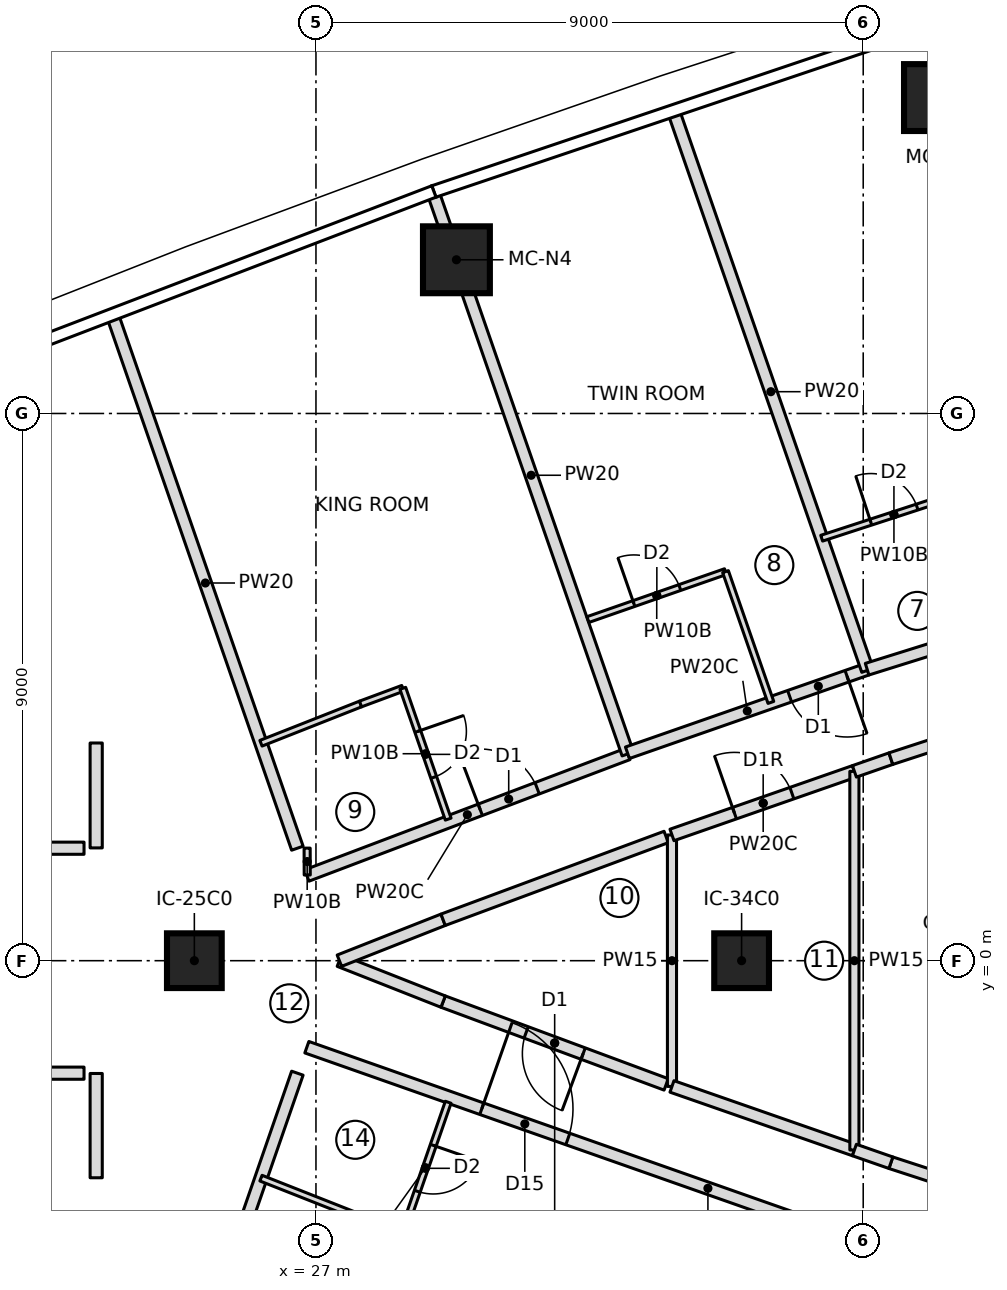
"""IFC4 building model, lengths in metres.
Left out: names, types, materials, properties, quantities, classifications, styles, units other than length and angle.
Written with IfcOpenShell. Run it as: python <this file> out.ifc"""

import sys

from ifc_helpers import new_model, si_unit, direction, frame, frame_2d, origin, origin_2d, place, context, subcontext, project, spatial, rectangle, extrude, element, fill, save


model = new_model("IFC4")
c1 = context("Model", 3, precision=1e-05, world=origin(), true_north=direction((0.0, 1.0)))
c2 = subcontext(c1, "Body", "Model", "MODEL_VIEW")
j1 = project(units=[si_unit("LENGTHUNIT", "METRE"), si_unit("PLANEANGLEUNIT", "RADIAN")], contexts=[c1])
p1 = place(None, origin())
s1 = spatial("IfcSite", under=j1, at=p1, CompositionType="ELEMENT")
p2 = place(p1, origin())
s2 = spatial("IfcBuilding", under=s1, at=p2, CompositionType="ELEMENT")
p3 = place(p2, frame((0.0, 0.0, 296.3)))
s3 = spatial("IfcBuildingStorey", under=s2, at=p3, CompositionType="ELEMENT", Elevation=296.3)
for number, where, z_axis, x_axis in (
    (1, (37.221, 14.196, 0.0), (0.0, 0.0, 1.0), (1.0, 0.0, 0.0)),
    (2, (29.31, 11.528, 0.0), (0.0, 0.0, 1.0), (1.0, 0.0, 0.0)),
):
    element("IfcColumn", number, at=place(p3, frame(where, z_axis=z_axis, x_axis=x_axis)), inside=s3, PredefinedType="COLUMN", context=c2, shape_type="SweptSolid", body=[
        extrude(rectangle(XDim=1.1, YDim=1.1, at=origin_2d()), origin(), (0.0, 0.0, 1.0), 3.55),
    ])
for number, where, z_axis, x_axis in (
    (3, (25.0, 0.0, 0.0), (0.0, 0.0, 1.0), (1.0, 0.0, 0.0)),
    (4, (34.0, 0.0, 0.0), (0.0, 0.0, 1.0), (1.0, 0.0, 0.0)),
):
    element("IfcColumn", number, at=place(p3, frame(where, z_axis=z_axis, x_axis=x_axis)), inside=s3, PredefinedType="COLUMN", context=c2, shape_type="SweptSolid", body=[
        extrude(rectangle(XDim=0.9, YDim=0.9, at=origin_2d()), origin(), (0.0, 0.0, 1.0), 3.55),
    ])
p4 = place(p3, frame((13.637, 1.85, 0.0), z_axis=(0.0, 0.0, 1.0), x_axis=(1.0, 0.0, 0.0)))
e5 = element("IfcWall", 5, at=p4, inside=s3, PredefinedType="PARTITIONING", context=c2, shape_type="SweptSolid", body=[
    extrude(rectangle(XDim=9.549, YDim=0.2, at=frame_2d((4.774, 0.0))), origin(), (0.0, 0.0, 1.0), 3.25),
])
p5 = place(p4, frame((4.274, 0.0, 0.0)))
e6 = element("IfcOpeningElement", 6, at=p5, cuts=e5, PredefinedType="OPENING", context=c2, shape_type="SweptSolid", body=[
    extrude(rectangle(XDim=1.0, YDim=2.1, at=frame_2d((0.5, 1.05))), frame((0.0, 0.11, 0.0), z_axis=(0.0, -1.0, 0.0), x_axis=(1.0, 0.0, 0.0)), (0.0, 0.0, 1.0), 0.22),
])
p6 = place(p3, frame((13.637, -1.85, 0.0), z_axis=(0.0, 0.0, 1.0), x_axis=(1.0, 0.0, 0.0)))
e7 = element("IfcWall", 7, at=p6, inside=s3, PredefinedType="PARTITIONING", context=c2, shape_type="SweptSolid", body=[
    extrude(rectangle(XDim=9.549, YDim=0.2, at=frame_2d((4.774, 0.0))), origin(), (0.0, 0.0, 1.0), 3.25),
])
p7 = place(p6, frame((4.274, 0.0, 0.0)))
e8 = element("IfcOpeningElement", 8, at=p7, cuts=e7, PredefinedType="OPENING", context=c2, shape_type="SweptSolid", body=[
    extrude(rectangle(XDim=1.0, YDim=2.1, at=frame_2d((0.5, 1.05))), frame((0.0, 0.11, 0.0), z_axis=(0.0, -1.0, 0.0), x_axis=(1.0, 0.0, 0.0)), (0.0, 0.0, 1.0), 0.22),
])
p8 = place(p3, frame((26.694, 1.85, 0.0), z_axis=(0.0, 0.0, 1.0), x_axis=(-0.327714422317, 0.944776829418, 0.0)))
e9 = element("IfcWall", 9, at=p8, inside=s3, PredefinedType="PARTITIONING", context=c2, shape_type="SweptSolid", body=[
    extrude(rectangle(XDim=9.233, YDim=0.2, at=frame_2d((4.617, 0.0))), origin(), (0.0, 0.0, 1.0), 3.25),
])
p9 = place(p3, frame((26.85, 1.401, 0.0), z_axis=(0.0, 0.0, 1.0), x_axis=(0.935181367748, 0.354169181912, 0.0)))
e10 = element("IfcWall", 10, at=p9, inside=s3, PredefinedType="PARTITIONING", context=c2, shape_type="SweptSolid", body=[
    extrude(rectangle(XDim=5.645, YDim=0.2, at=frame_2d((2.823, 0.0))), origin(), (0.0, 0.0, 1.0), 3.25),
])
p10 = place(p9, frame((3.05, 0.0, 0.0)))
e11 = element("IfcOpeningElement", 11, at=p10, cuts=e10, PredefinedType="OPENING", context=c2, shape_type="SweptSolid", body=[
    extrude(rectangle(XDim=1.0, YDim=2.1, at=frame_2d((0.5, 1.05))), frame((0.0, 0.11, 0.0), z_axis=(0.0, -1.0, 0.0), x_axis=(1.0, 0.0, 0.0)), (0.0, 0.0, 1.0), 0.22),
])
p11 = place(p3, frame((26.096, 3.576, 0.0), z_axis=(0.0, 0.0, 1.0), x_axis=(0.930254925629, 0.366913850028, 0.0)))
e12 = element("IfcWall", 12, at=p11, inside=s3, PredefinedType="PARTITIONING", context=c2, shape_type="SweptSolid", body=[
    extrude(rectangle(XDim=1.76, YDim=0.1, at=frame_2d((0.88, 0.0))), origin(), (0.0, 0.0, 1.0), 3.25),
])
p12 = place(p3, frame((27.733, 4.222, 0.0), z_axis=(0.0, 0.0, 1.0), x_axis=(0.937514267289, 0.347946833049, 0.0)))
e13 = element("IfcWall", 13, at=p12, inside=s3, PredefinedType="PARTITIONING", context=c2, shape_type="SweptSolid", body=[
    extrude(rectangle(XDim=0.742, YDim=0.1, at=frame_2d((0.371, 0.0))), origin(), (0.0, 0.0, 1.0), 3.25),
])
p13 = place(p3, frame((28.428, 4.48, 0.0), z_axis=(0.0, 0.0, 1.0), x_axis=(0.327718024288, -0.944775579996, 0.0)))
e14 = element("IfcWall", 14, at=p13, inside=s3, PredefinedType="PARTITIONING", context=c2, shape_type="SweptSolid", body=[
    extrude(rectangle(XDim=2.277, YDim=0.1, at=frame_2d((1.139, 0.0))), origin(), (0.0, 0.0, 1.0), 3.25),
])
p14 = place(p13, frame((0.75, 0.0, 0.0)))
e15 = element("IfcOpeningElement", 15, at=p14, cuts=e14, PredefinedType="OPENING", context=c2, shape_type="SweptSolid", body=[
    extrude(rectangle(XDim=0.8, YDim=2.1, at=frame_2d((0.4, 1.05))), frame((0.0, 0.06, 0.0), z_axis=(0.0, -1.0, 0.0), x_axis=(1.0, 0.0, 0.0)), (0.0, 0.0, 1.0), 0.12),
])
p15 = place(p3, frame((32.129, 3.401, 0.0), z_axis=(0.0, 0.0, 1.0), x_axis=(-0.327724115377, 0.944773467134, 0.0)))
e16 = element("IfcWall", 16, at=p15, inside=s3, PredefinedType="PARTITIONING", context=c2, shape_type="SweptSolid", body=[
    extrude(rectangle(XDim=9.702, YDim=0.2, at=frame_2d((4.851, 0.0))), origin(), (0.0, 0.0, 1.0), 3.25),
])
p16 = place(p3, frame((36.064, 4.794, 0.0), z_axis=(0.0, 0.0, 1.0), x_axis=(-0.944236129554, -0.329269086986, 0.0)))
e17 = element("IfcWall", 17, at=p16, inside=s3, PredefinedType="PARTITIONING", context=c2, shape_type="SweptSolid", body=[
    extrude(rectangle(XDim=4.174, YDim=0.2, at=frame_2d((2.087, 0.0))), origin(), (0.0, 0.0, 1.0), 3.25),
])
p17 = place(p16, frame((0.35, 0.0, 0.0)))
e18 = element("IfcOpeningElement", 18, at=p17, cuts=e17, PredefinedType="OPENING", context=c2, shape_type="SweptSolid", body=[
    extrude(rectangle(XDim=1.0, YDim=2.1, at=frame_2d((0.5, 1.05))), frame((0.0, 0.11, 0.0), z_axis=(0.0, -1.0, 0.0), x_axis=(1.0, 0.0, 0.0)), (0.0, 0.0, 1.0), 0.22),
])
p18 = place(p3, frame((31.473, 5.611, 0.0), z_axis=(0.0, 0.0, 1.0), x_axis=(0.944305532659, 0.329069994059, 0.0)))
e19 = element("IfcWall", 19, at=p18, inside=s3, PredefinedType="PARTITIONING", context=c2, shape_type="SweptSolid", body=[
    extrude(rectangle(XDim=2.396, YDim=0.1, at=frame_2d((1.198, 0.0))), origin(), (0.0, 0.0, 1.0), 3.25),
])
p19 = place(p18, frame((0.8, 0.0, 0.0)))
e20 = element("IfcOpeningElement", 20, at=p19, cuts=e19, PredefinedType="OPENING", context=c2, shape_type="SweptSolid", body=[
    extrude(rectangle(XDim=0.8, YDim=2.1, at=frame_2d((0.4, 1.05))), frame((0.0, 0.06, 0.0), z_axis=(0.0, -1.0, 0.0), x_axis=(1.0, 0.0, 0.0)), (0.0, 0.0, 1.0), 0.12),
])
p20 = place(p3, frame((33.735, 6.399, 0.0), z_axis=(0.0, 0.0, 1.0), x_axis=(0.32768871219, -0.944785747089, 0.0)))
e21 = element("IfcWall", 21, at=p20, inside=s3, PredefinedType="PARTITIONING", context=c2, shape_type="SweptSolid", body=[
    extrude(rectangle(XDim=2.277, YDim=0.1, at=frame_2d((1.138, 0.0))), origin(), (0.0, 0.0, 1.0), 3.25),
])
p21 = place(p3, frame((36.071, 4.775, 0.0), z_axis=(0.0, 0.0, 1.0), x_axis=(-0.327725028322, 0.94477315045, 0.0)))
e22 = element("IfcWall", 22, at=p21, inside=s3, PredefinedType="PARTITIONING", context=c2, shape_type="SweptSolid", body=[
    extrude(rectangle(XDim=9.702, YDim=0.2, at=frame_2d((4.851, 0.0))), origin(), (0.0, 0.0, 1.0), 3.25),
])
p22 = place(p3, frame((44.031, 7.286, 0.0), z_axis=(0.0, 0.0, 1.0), x_axis=(-0.95441177989, -0.29849313963, 0.0)))
e23 = element("IfcWall", 23, at=p22, inside=s3, PredefinedType="PARTITIONING", context=c2, shape_type="SweptSolid", body=[
    extrude(rectangle(XDim=8.348, YDim=0.2, at=frame_2d((4.174, 0.0))), origin(), (0.0, 0.0, 1.0), 3.25),
])
p23 = place(p22, frame((0.35, 0.0, 0.0)))
e24 = element("IfcOpeningElement", 24, at=p23, cuts=e23, PredefinedType="OPENING", context=c2, shape_type="SweptSolid", body=[
    extrude(rectangle(XDim=1.5, YDim=2.1, at=frame_2d((0.75, 1.05))), frame((0.0, 0.11, 0.0), z_axis=(0.0, -1.0, 0.0), x_axis=(1.0, 0.0, 0.0)), (0.0, 0.0, 1.0), 0.22),
])
p24 = place(p3, frame((35.317, 6.948, 0.0), z_axis=(0.0, 0.0, 1.0), x_axis=(0.950666002187, 0.310216299194, 0.0)))
e25 = element("IfcWall", 25, at=p24, inside=s3, PredefinedType="PARTITIONING", context=c2, shape_type="SweptSolid", body=[
    extrude(rectangle(XDim=2.5, YDim=0.1, at=frame_2d((1.25, 0.0))), origin(), (0.0, 0.0, 1.0), 3.25),
])
p25 = place(p24, frame((0.85, 0.0, 0.0)))
e26 = element("IfcOpeningElement", 26, at=p25, cuts=e25, PredefinedType="OPENING", context=c2, shape_type="SweptSolid", body=[
    extrude(rectangle(XDim=0.8, YDim=2.1, at=frame_2d((0.4, 1.05))), frame((0.0, 0.06, 0.0), z_axis=(0.0, -1.0, 0.0), x_axis=(1.0, 0.0, 0.0)), (0.0, 0.0, 1.0), 0.12),
])
p26 = place(p3, frame((23.668, -10.573, 0.0), z_axis=(0.0, 0.0, 1.0), x_axis=(0.327714422317, 0.944776829418, 0.0)))
e27 = element("IfcWall", 27, at=p26, inside=s3, PredefinedType="PARTITIONING", context=c2, shape_type="SweptSolid", body=[
    extrude(rectangle(XDim=9.233, YDim=0.2, at=frame_2d((4.617, 0.0))), origin(), (0.0, 0.0, 1.0), 3.25),
])
p27 = place(p3, frame((26.85, -1.423, 0.0), z_axis=(0.0, 0.0, 1.0), x_axis=(0.943328585164, -0.331860182022, 0.0)))
e28 = element("IfcWall", 28, at=p27, inside=s3, PredefinedType="PARTITIONING", context=c2, shape_type="SweptSolid", body=[
    extrude(rectangle(XDim=13.984, YDim=0.2, at=frame_2d((6.992, 0.0))), origin(), (0.0, 0.0, 1.0), 3.25),
])
p28 = place(p27, frame((3.05, 0.0, 0.0)))
e29 = element("IfcOpeningElement", 29, at=p28, cuts=e28, PredefinedType="OPENING", context=c2, shape_type="SweptSolid", body=[
    extrude(rectangle(XDim=1.5, YDim=2.1, at=frame_2d((0.75, 1.05))), frame((0.0, 0.11, 0.0), z_axis=(0.0, -1.0, 0.0), x_axis=(1.0, 0.0, 0.0)), (0.0, 0.0, 1.0), 0.22),
])
p29 = place(p3, frame((29.175, -2.328, 0.0), z_axis=(0.0, 0.0, 1.0), x_axis=(-0.327718024288, -0.944775579996, 0.0)))
e30 = element("IfcWall", 30, at=p29, inside=s3, PredefinedType="PARTITIONING", context=c2, shape_type="SweptSolid", body=[
    extrude(rectangle(XDim=2.277, YDim=0.1, at=frame_2d((1.139, 0.0))), origin(), (0.0, 0.0, 1.0), 3.25),
])
p30 = place(p29, frame((0.75, 0.0, 0.0)))
e31 = element("IfcOpeningElement", 31, at=p30, cuts=e30, PredefinedType="OPENING", context=c2, shape_type="SweptSolid", body=[
    extrude(rectangle(XDim=0.8, YDim=2.1, at=frame_2d((0.4, 1.05))), frame((0.0, 0.06, 0.0), z_axis=(0.0, -1.0, 0.0), x_axis=(1.0, 0.0, 0.0)), (0.0, 0.0, 1.0), 0.12),
])
p31 = place(p3, frame((27.733, -4.222, 0.0), z_axis=(0.0, 0.0, 1.0), x_axis=(-0.930254925629, 0.366913850028, 0.0)))
e32 = element("IfcWall", 32, at=p31, inside=s3, PredefinedType="PARTITIONING", context=c2, shape_type="SweptSolid", body=[
    extrude(rectangle(XDim=1.76, YDim=0.1, at=frame_2d((0.88, 0.0))), origin(), (0.0, 0.0, 1.0), 3.25),
])
p32 = place(p3, frame((32.76, -2.035, 0.0), z_axis=(0.0, 0.0, 1.0), x_axis=(-0.937460178932, 0.348092534992, 0.0)))
e33 = element("IfcWall", 33, at=p32, inside=s3, PredefinedType="PARTITIONING", context=c2, shape_type="SweptSolid", body=[
    extrude(rectangle(XDim=3.913, YDim=0.2, at=frame_2d((1.957, 0.0))), origin(), (0.0, 0.0, 1.0), 3.25),
])
p33 = place(p32, frame((1.457, 0.0, 0.0)))
e34 = element("IfcOpeningElement", 34, at=p33, cuts=e33, PredefinedType="OPENING", context=c2, shape_type="SweptSolid", body=[
    extrude(rectangle(XDim=1.0, YDim=2.1, at=frame_2d((0.5, 1.05))), frame((0.0, 0.11, 0.0), z_axis=(0.0, -1.0, 0.0), x_axis=(1.0, 0.0, 0.0)), (0.0, 0.0, 1.0), 0.22),
])
for number, where, z_axis, x_axis in (
    (35, (29.092, -0.673, 0.0), (0.0, 0.0, 1.0), (-0.93, 0.367, 0.0)),
    (36, (27.385, 0.0, 0.0), (0.0, 0.0, 1.0), (0.93, 0.367, 0.0)),
):
    element("IfcWall", number, at=place(p3, frame(where, z_axis=z_axis, x_axis=x_axis)), inside=s3, PredefinedType="PARTITIONING", context=c2, shape_type="SweptSolid", body=[
        extrude(rectangle(XDim=1.834, YDim=0.2, at=frame_2d((0.917, 0.0))), origin(), (0.0, 0.0, 1.0), 3.25),
    ])
p34 = place(p3, frame((29.092, 0.673, 0.0), z_axis=(0.0, 0.0, 1.0), x_axis=(0.937460178932, 0.348092534992, 0.0)))
e37 = element("IfcWall", 37, at=p34, inside=s3, PredefinedType="PARTITIONING", context=c2, shape_type="SweptSolid", body=[
    extrude(rectangle(XDim=3.913, YDim=0.2, at=frame_2d((1.957, 0.0))), origin(), (0.0, 0.0, 1.0), 3.25),
])
p35 = place(p3, frame((32.855, -2.068, 0.0), z_axis=(0.0, 0.0, 1.0), x_axis=(0.0, 1.0, 0.0)))
e38 = element("IfcWall", 38, at=p35, inside=s3, PredefinedType="PARTITIONING", context=c2, shape_type="SweptSolid", body=[
    extrude(rectangle(XDim=4.136, YDim=0.15, at=frame_2d((2.068, 0.0))), origin(), (0.0, 0.0, 1.0), 3.25),
])
p36 = place(p3, frame((32.855, 2.068, 0.0), z_axis=(0.0, 0.0, 1.0), x_axis=(0.944260188635, 0.329200085296, 0.0)))
e39 = element("IfcWall", 39, at=p36, inside=s3, PredefinedType="PARTITIONING", context=c2, shape_type="SweptSolid", body=[
    extrude(rectangle(XDim=3.177, YDim=0.2, at=frame_2d((1.588, 0.0))), origin(), (0.0, 0.0, 1.0), 3.25),
])
p37 = place(p36, frame((1.088, 0.0, 0.0)))
e40 = element("IfcOpeningElement", 40, at=p37, cuts=e39, PredefinedType="OPENING", context=c2, shape_type="SweptSolid", body=[
    extrude(rectangle(XDim=1.0, YDim=2.1, at=frame_2d((0.5, 1.05))), frame((0.0, 0.11, 0.0), z_axis=(0.0, -1.0, 0.0), x_axis=(1.0, 0.0, 0.0)), (0.0, 0.0, 1.0), 0.22),
])
p38 = place(p3, frame((35.855, -3.114, 0.0), z_axis=(0.0, 0.0, 1.0), x_axis=(-0.944260188635, 0.329200085296, 0.0)))
e41 = element("IfcWall", 41, at=p38, inside=s3, PredefinedType="PARTITIONING", context=c2, shape_type="SweptSolid", body=[
    extrude(rectangle(XDim=3.177, YDim=0.2, at=frame_2d((1.588, 0.0))), origin(), (0.0, 0.0, 1.0), 3.25),
])
p39 = place(p3, frame((35.855, -3.114, 0.0), z_axis=(0.0, 0.0, 1.0), x_axis=(0.0, 1.0, 0.0)))
e42 = element("IfcWall", 42, at=p39, inside=s3, PredefinedType="PARTITIONING", context=c2, shape_type="SweptSolid", body=[
    extrude(rectangle(XDim=6.228, YDim=0.15, at=frame_2d((3.114, 0.0))), origin(), (0.0, 0.0, 1.0), 3.25),
])
p40 = place(p3, frame((39.866, -4.435, 0.0), z_axis=(0.0, 0.0, 1.0), x_axis=(-0.950718067733, 0.310056697535, 0.0)))
e43 = element("IfcWall", 43, at=p40, inside=s3, PredefinedType="PARTITIONING", context=c2, shape_type="SweptSolid", body=[
    extrude(rectangle(XDim=3.588, YDim=0.2, at=frame_2d((1.794, 0.0))), origin(), (0.0, 0.0, 1.0), 3.25),
])
p41 = place(p40, frame((1.294, 0.0, 0.0)))
e44 = element("IfcOpeningElement", 44, at=p41, cuts=e43, PredefinedType="OPENING", context=c2, shape_type="SweptSolid", body=[
    extrude(rectangle(XDim=1.0, YDim=2.1, at=frame_2d((0.5, 1.05))), frame((0.0, 0.11, 0.0), z_axis=(0.0, -1.0, 0.0), x_axis=(1.0, 0.0, 0.0)), (0.0, 0.0, 1.0), 0.22),
])
for number, where, z_axis, x_axis in (
    (45, (36.455, -3.323, 0.0), (0.0, 0.0, 1.0), (-0.944, 0.329, 0.0)),
    (46, (35.855, 3.114, 0.0), (0.0, 0.0, 1.0), (0.944, 0.329, 0.0)),
):
    element("IfcWall", number, at=place(p3, frame(where, z_axis=z_axis, x_axis=x_axis)), inside=s3, PredefinedType="PARTITIONING", context=c2, shape_type="SweptSolid", body=[
        extrude(rectangle(XDim=0.635, YDim=0.2, at=frame_2d((0.317, 0.0))), origin(), (0.0, 0.0, 1.0), 3.25),
    ])
p42 = place(p3, frame((36.455, 3.323, 0.0), z_axis=(0.0, 0.0, 1.0), x_axis=(0.950718067733, 0.310056697535, 0.0)))
e47 = element("IfcWall", 47, at=p42, inside=s3, PredefinedType="PARTITIONING", context=c2, shape_type="SweptSolid", body=[
    extrude(rectangle(XDim=3.588, YDim=0.2, at=frame_2d((1.794, 0.0))), origin(), (0.0, 0.0, 1.0), 3.25),
])
p43 = place(p3, frame((26.856, 1.409, 0.0), z_axis=(0.0, 0.0, 1.0), x_axis=(-0.003863105832, 0.999992538179, 0.0)))
e48 = element("IfcWall", 48, at=p43, inside=s3, PredefinedType="PARTITIONING", context=c2, shape_type="SweptSolid", body=[
    extrude(rectangle(XDim=0.442, YDim=0.1, at=frame_2d((0.221, 0.0))), origin(), (0.0, 0.0, 1.0), 3.25),
])
p44 = place(p3, frame((23.386, 3.58, 0.0), z_axis=(0.0, 0.0, 1.0), x_axis=(0.0, -1.0, 0.0)))
e49 = element("IfcWall", 49, at=p44, inside=s3, PredefinedType="PARTITIONING", context=c2, shape_type="SweptSolid", body=[
    extrude(rectangle(XDim=1.725, YDim=0.2, at=frame_2d((0.863, 0.0))), origin(), (0.0, 0.0, 1.0), 3.25),
])
p45 = place(p3, frame((23.386, -1.855, 0.0), z_axis=(0.0, 0.0, 1.0), x_axis=(0.0, -1.0, 0.0)))
e50 = element("IfcWall", 50, at=p45, inside=s3, PredefinedType="PARTITIONING", context=c2, shape_type="SweptSolid", body=[
    extrude(rectangle(XDim=1.715, YDim=0.2, at=frame_2d((0.858, 0.0))), origin(), (0.0, 0.0, 1.0), 3.25),
])
p46 = place(p14, origin())
e51 = element("IfcDoor", 51, at=p46, inside=s3, OperationType="SINGLE_SWING_LEFT", PredefinedType="DOOR", context=c2, shape_type="SweptSolid", body=[
    extrude(rectangle(XDim=0.8, YDim=2.1, at=frame_2d((0.4, 1.05))), frame((0.0, 0.025, 0.0), z_axis=(0.0, -1.0, 0.0), x_axis=(1.0, 0.0, 0.0)), (0.0, 0.0, 1.0), 0.05),
])
fill(e15, e51)
p47 = place(p10, origin())
e52 = element("IfcDoor", 52, at=p47, inside=s3, OperationType="SINGLE_SWING_LEFT", PredefinedType="DOOR", context=c2, shape_type="SweptSolid", body=[
    extrude(rectangle(XDim=1.0, YDim=2.1, at=frame_2d((0.5, 1.05))), frame((0.0, 0.025, 0.0), z_axis=(0.0, -1.0, 0.0), x_axis=(1.0, 0.0, 0.0)), (0.0, 0.0, 1.0), 0.05),
])
fill(e11, e52)
p48 = place(p19, origin())
e53 = element("IfcDoor", 53, at=p48, inside=s3, OperationType="SINGLE_SWING_LEFT", PredefinedType="DOOR", context=c2, shape_type="SweptSolid", body=[
    extrude(rectangle(XDim=0.8, YDim=2.1, at=frame_2d((0.4, 1.05))), frame((0.0, 0.025, 0.0), z_axis=(0.0, -1.0, 0.0), x_axis=(1.0, 0.0, 0.0)), (0.0, 0.0, 1.0), 0.05),
])
fill(e20, e53)
p49 = place(p17, origin())
e54 = element("IfcDoor", 54, at=p49, inside=s3, OperationType="SINGLE_SWING_LEFT", PredefinedType="DOOR", context=c2, shape_type="SweptSolid", body=[
    extrude(rectangle(XDim=1.0, YDim=2.1, at=frame_2d((0.5, 1.05))), frame((0.0, 0.025, 0.0), z_axis=(0.0, -1.0, 0.0), x_axis=(1.0, 0.0, 0.0)), (0.0, 0.0, 1.0), 0.05),
])
fill(e18, e54)
p50 = place(p25, origin())
e55 = element("IfcDoor", 55, at=p50, inside=s3, OperationType="SINGLE_SWING_LEFT", PredefinedType="DOOR", context=c2, shape_type="SweptSolid", body=[
    extrude(rectangle(XDim=0.8, YDim=2.1, at=frame_2d((0.4, 1.05))), frame((0.0, 0.025, 0.0), z_axis=(0.0, -1.0, 0.0), x_axis=(1.0, 0.0, 0.0)), (0.0, 0.0, 1.0), 0.05),
])
fill(e26, e55)
p51 = place(p30, origin())
e56 = element("IfcDoor", 56, at=p51, inside=s3, OperationType="SINGLE_SWING_LEFT", PredefinedType="DOOR", context=c2, shape_type="SweptSolid", body=[
    extrude(rectangle(XDim=0.8, YDim=2.1, at=frame_2d((0.4, 1.05))), frame((0.0, 0.025, 0.0), z_axis=(0.0, -1.0, 0.0), x_axis=(1.0, 0.0, 0.0)), (0.0, 0.0, 1.0), 0.05),
])
fill(e31, e56)
p52 = place(p28, origin())
e57 = element("IfcDoor", 57, at=p52, inside=s3, OperationType="DOUBLE_DOOR_SINGLE_SWING", PredefinedType="DOOR", context=c2, shape_type="SweptSolid", body=[
    extrude(rectangle(XDim=1.5, YDim=2.1, at=frame_2d((0.75, 1.05))), frame((0.0, 0.025, 0.0), z_axis=(0.0, -1.0, 0.0), x_axis=(1.0, 0.0, 0.0)), (0.0, 0.0, 1.0), 0.05),
])
fill(e29, e57)
p53 = place(p33, origin())
e58 = element("IfcDoor", 58, at=p53, inside=s3, OperationType="SINGLE_SWING_LEFT", PredefinedType="DOOR", context=c2, shape_type="SweptSolid", body=[
    extrude(rectangle(XDim=1.0, YDim=2.1, at=frame_2d((0.5, 1.05))), frame((0.0, 0.025, 0.0), z_axis=(0.0, -1.0, 0.0), x_axis=(1.0, 0.0, 0.0)), (0.0, 0.0, 1.0), 0.05),
])
fill(e34, e58)
p54 = place(p37, origin())
e59 = element("IfcDoor", 59, at=p54, inside=s3, OperationType="SINGLE_SWING_RIGHT", PredefinedType="DOOR", context=c2, shape_type="SweptSolid", body=[
    extrude(rectangle(XDim=1.0, YDim=2.1, at=frame_2d((0.5, 1.05))), frame((0.0, 0.025, 0.0), z_axis=(0.0, -1.0, 0.0), x_axis=(1.0, 0.0, 0.0)), (0.0, 0.0, 1.0), 0.05),
])
fill(e40, e59)
save(model, sys.argv[1])
